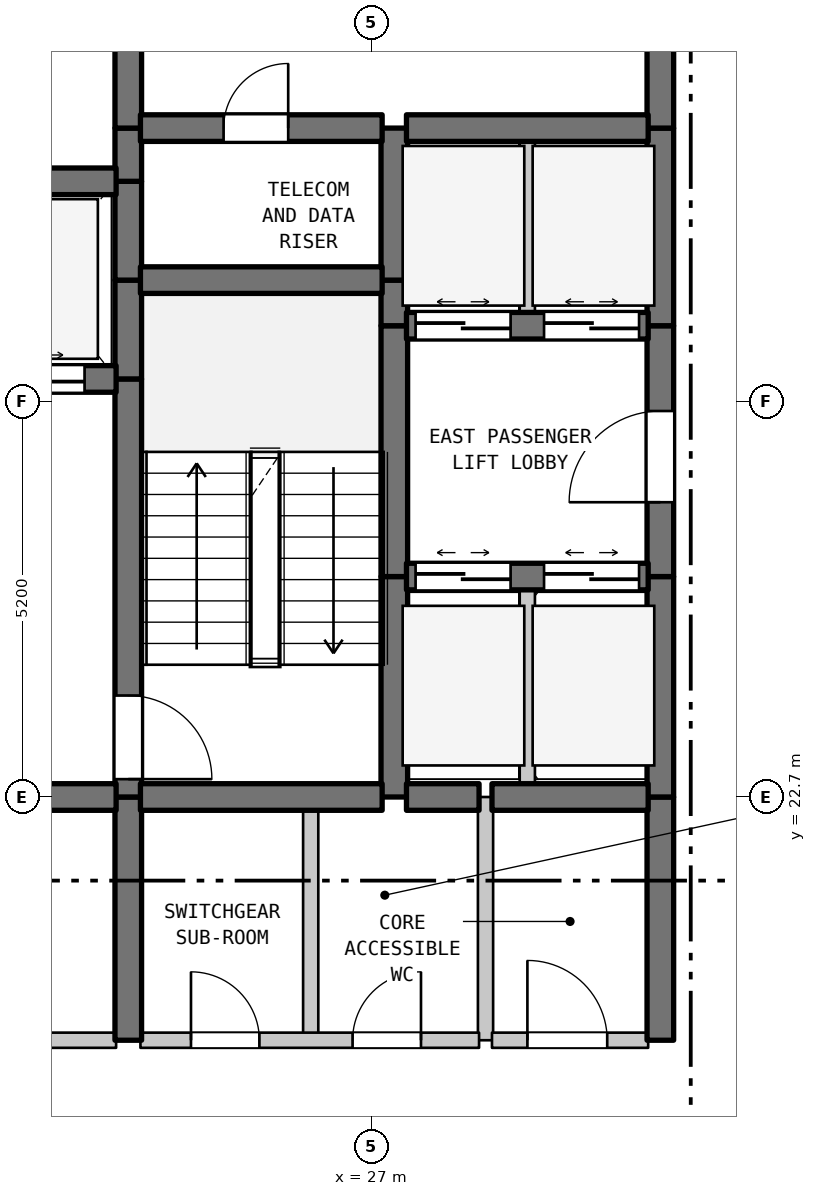
"""IFC4 building model, lengths in metres.
Left out: names, types, materials, properties, quantities, classifications, styles, units other than length and angle.
Written with IfcOpenShell. Run it as: python <this file> out.ifc"""

import sys

from ifc_helpers import new_model, si_unit, direction, frame, frame_2d, origin, place, context, subcontext, project, spatial, rectangle, extrude, element, fill, save


model = new_model("IFC4")
c1 = context("Model", 3, precision=1e-05, world=origin(), true_north=direction((0.0, 1.0)))
c2 = subcontext(c1, "Body", "Model", "MODEL_VIEW")
j1 = project(units=[si_unit("LENGTHUNIT", "METRE"), si_unit("PLANEANGLEUNIT", "RADIAN")], contexts=[c1])
p1 = place(None, origin())
s1 = spatial("IfcSite", under=j1, at=p1, CompositionType="ELEMENT")
p2 = place(p1, origin())
s2 = spatial("IfcBuilding", under=s1, at=p2, CompositionType="ELEMENT")
p3 = place(p2, frame((0.0, 0.0, 94.6)))
s3 = spatial("IfcBuildingStorey", under=s2, at=p3, CompositionType="ELEMENT", Elevation=94.6)
p4 = place(p3, frame((23.8, 19.5, 0.0), z_axis=(0.0, 0.0, 1.0), x_axis=(0.0, 1.0, 0.0)))
e1 = element("IfcWall", 1, at=p4, inside=s3, PredefinedType="SHEAR", context=c2, shape_type="SweptSolid", body=[
    extrude(rectangle(XDim=3.2, YDim=0.35, at=frame_2d((1.6, 0.0))), origin(), (0.0, 0.0, 1.0), 3.385),
])
p5 = place(p3, frame((23.8, 22.7, 0.0), z_axis=(0.0, 0.0, 1.0), x_axis=(0.0, 1.0, 0.0)))
e2 = element("IfcWall", 2, at=p5, inside=s3, PredefinedType="SHEAR", context=c2, shape_type="SweptSolid", body=[
    extrude(rectangle(XDim=5.5, YDim=0.35, at=frame_2d((2.75, 0.0))), origin(), (0.0, 0.0, 1.0), 3.385),
])
p6 = place(p5, frame((0.235, 0.0, 0.0)))
e3 = element("IfcOpeningElement", 3, at=p6, cuts=e2, PredefinedType="OPENING", context=c2, shape_type="SweptSolid", body=[
    extrude(rectangle(XDim=1.1, YDim=2.15, at=frame_2d((0.55, 1.075))), frame((0.0, 0.185, 0.0), z_axis=(0.0, -1.0, 0.0), x_axis=(1.0, 0.0, 0.0)), (0.0, 0.0, 1.0), 0.37),
])
for number, where, z_axis, x_axis in (
    (4, (23.8, 28.2, 0.0), (0.0, 0.0, 1.0), (0.0, 1.0, 0.0)),
    (5, (23.8, 29.5, 0.0), (0.0, 0.0, 1.0), (0.0, 1.0, 0.0)),
):
    element("IfcWall", number, at=place(p3, frame(where, z_axis=z_axis, x_axis=x_axis)), inside=s3, PredefinedType="SHEAR", context=c2, shape_type="SweptSolid", body=[
        extrude(rectangle(XDim=1.3, YDim=0.35, at=frame_2d((0.65, 0.0))), origin(), (0.0, 0.0, 1.0), 3.385),
    ])
p7 = place(p3, frame((23.8, 30.8, 0.0), z_axis=(0.0, 0.0, 1.0), x_axis=(0.0, 1.0, 0.0)))
e6 = element("IfcWall", 6, at=p7, inside=s3, PredefinedType="SHEAR", context=c2, shape_type="SweptSolid", body=[
    extrude(rectangle(XDim=0.7, YDim=0.35, at=frame_2d((0.35, 0.0))), origin(), (0.0, 0.0, 1.0), 3.385),
])
p8 = place(p3, frame((23.8, 31.5, 0.0), z_axis=(0.0, 0.0, 1.0), x_axis=(0.0, 1.0, 0.0)))
e7 = element("IfcWall", 7, at=p8, inside=s3, PredefinedType="SHEAR", context=c2, shape_type="SweptSolid", body=[
    extrude(rectangle(XDim=3.5, YDim=0.35, at=frame_2d((1.75, 0.0))), origin(), (0.0, 0.0, 1.0), 3.385),
])
p9 = place(p8, frame((1.127, 0.0, 0.0)))
e8 = element("IfcOpeningElement", 8, at=p9, cuts=e7, PredefinedType="OPENING", context=c2, shape_type="SweptSolid", body=[
    extrude(rectangle(XDim=1.1, YDim=2.15, at=frame_2d((0.55, 1.075))), frame((0.0, 0.185, 0.0), z_axis=(0.0, -1.0, 0.0), x_axis=(1.0, 0.0, 0.0)), (0.0, 0.0, 1.0), 0.37),
])
p10 = place(p3, frame((26.2, 19.5, 0.0), z_axis=(0.0, 0.0, 1.0), x_axis=(0.0, 1.0, 0.0)))
e9 = element("IfcWall", 9, at=p10, inside=s3, PredefinedType="STANDARD", context=c2, shape_type="SweptSolid", body=[
    extrude(rectangle(XDim=3.2, YDim=0.2, at=frame_2d((1.6, 0.0))), origin(), (0.0, 0.0, 1.0), 3.385),
])
p11 = place(p3, frame((27.3, 22.7, 0.0), z_axis=(0.0, 0.0, 1.0), x_axis=(0.0, 1.0, 0.0)))
e10 = element("IfcWall", 10, at=p11, inside=s3, PredefinedType="SHEAR", context=c2, shape_type="SweptSolid", body=[
    extrude(rectangle(XDim=2.9, YDim=0.35, at=frame_2d((1.45, 0.0))), origin(), (0.0, 0.0, 1.0), 3.385),
])
p12 = place(p3, frame((27.3, 25.6, 0.0), z_axis=(0.0, 0.0, 1.0), x_axis=(0.0, 1.0, 0.0)))
e11 = element("IfcWall", 11, at=p12, inside=s3, PredefinedType="SHEAR", context=c2, shape_type="SweptSolid", body=[
    extrude(rectangle(XDim=3.3, YDim=0.35, at=frame_2d((1.65, 0.0))), origin(), (0.0, 0.0, 1.0), 3.385),
])
p13 = place(p3, frame((27.3, 28.9, 0.0), z_axis=(0.0, 0.0, 1.0), x_axis=(0.0, 1.0, 0.0)))
e12 = element("IfcWall", 12, at=p13, inside=s3, PredefinedType="SHEAR", context=c2, shape_type="SweptSolid", body=[
    extrude(rectangle(XDim=0.6, YDim=0.35, at=frame_2d((0.3, 0.0))), origin(), (0.0, 0.0, 1.0), 3.385),
])
p14 = place(p3, frame((27.3, 29.5, 0.0), z_axis=(0.0, 0.0, 1.0), x_axis=(0.0, 1.0, 0.0)))
e13 = element("IfcWall", 13, at=p14, inside=s3, PredefinedType="SHEAR", context=c2, shape_type="SweptSolid", body=[
    extrude(rectangle(XDim=2.0, YDim=0.35, at=frame_2d((1.0, 0.0))), origin(), (0.0, 0.0, 1.0), 3.385),
])
p15 = place(p3, frame((28.5, 19.5, 0.0), z_axis=(0.0, 0.0, 1.0), x_axis=(0.0, 1.0, 0.0)))
e14 = element("IfcWall", 14, at=p15, inside=s3, PredefinedType="STANDARD", context=c2, shape_type="SweptSolid", body=[
    extrude(rectangle(XDim=3.2, YDim=0.2, at=frame_2d((1.6, 0.0))), origin(), (0.0, 0.0, 1.0), 3.385),
])
p16 = place(p3, frame((29.05, 22.7, 0.0), z_axis=(0.0, 0.0, 1.0), x_axis=(0.0, 1.0, 0.0)))
e15 = element("IfcWall", 15, at=p16, inside=s3, PredefinedType="STANDARD", context=c2, shape_type="SweptSolid", body=[
    extrude(rectangle(XDim=2.9, YDim=0.2, at=frame_2d((1.45, 0.0))), origin(), (0.0, 0.0, 1.0), 3.385),
])
p17 = place(p3, frame((29.05, 28.9, 0.0), z_axis=(0.0, 0.0, 1.0), x_axis=(0.0, 1.0, 0.0)))
e16 = element("IfcWall", 16, at=p17, inside=s3, PredefinedType="STANDARD", context=c2, shape_type="SweptSolid", body=[
    extrude(rectangle(XDim=2.6, YDim=0.2, at=frame_2d((1.3, 0.0))), origin(), (0.0, 0.0, 1.0), 3.385),
])
p18 = place(p3, frame((30.8, 19.5, 0.0), z_axis=(0.0, 0.0, 1.0), x_axis=(0.0, 1.0, 0.0)))
e17 = element("IfcWall", 17, at=p18, inside=s3, PredefinedType="SHEAR", context=c2, shape_type="SweptSolid", body=[
    extrude(rectangle(XDim=3.2, YDim=0.35, at=frame_2d((1.6, 0.0))), origin(), (0.0, 0.0, 1.0), 3.385),
])
p19 = place(p3, frame((30.8, 22.7, 0.0), z_axis=(0.0, 0.0, 1.0), x_axis=(0.0, 1.0, 0.0)))
e18 = element("IfcWall", 18, at=p19, inside=s3, PredefinedType="SHEAR", context=c2, shape_type="SweptSolid", body=[
    extrude(rectangle(XDim=2.9, YDim=0.35, at=frame_2d((1.45, 0.0))), origin(), (0.0, 0.0, 1.0), 3.385),
])
p20 = place(p3, frame((30.8, 25.6, 0.0), z_axis=(0.0, 0.0, 1.0), x_axis=(0.0, 1.0, 0.0)))
e19 = element("IfcWall", 19, at=p20, inside=s3, PredefinedType="SHEAR", context=c2, shape_type="SweptSolid", body=[
    extrude(rectangle(XDim=3.3, YDim=0.35, at=frame_2d((1.65, 0.0))), origin(), (0.0, 0.0, 1.0), 3.385),
])
p21 = place(p20, frame((0.978, 0.0, 0.0)))
e20 = element("IfcOpeningElement", 20, at=p21, cuts=e19, PredefinedType="OPENING", context=c2, shape_type="SweptSolid", body=[
    extrude(rectangle(XDim=1.2, YDim=2.2, at=frame_2d((0.6, 1.1))), frame((0.0, 0.185, 0.0), z_axis=(0.0, -1.0, 0.0), x_axis=(1.0, 0.0, 0.0)), (0.0, 0.0, 1.0), 0.37),
])
p22 = place(p3, frame((30.8, 28.9, 0.0), z_axis=(0.0, 0.0, 1.0), x_axis=(0.0, 1.0, 0.0)))
e21 = element("IfcWall", 21, at=p22, inside=s3, PredefinedType="SHEAR", context=c2, shape_type="SweptSolid", body=[
    extrude(rectangle(XDim=2.6, YDim=0.35, at=frame_2d((1.3, 0.0))), origin(), (0.0, 0.0, 1.0), 3.385),
])
p23 = place(p3, frame((30.8, 31.5, 0.0), z_axis=(0.0, 0.0, 1.0), x_axis=(0.0, 1.0, 0.0)))
e22 = element("IfcWall", 22, at=p23, inside=s3, PredefinedType="SHEAR", context=c2, shape_type="SweptSolid", body=[
    extrude(rectangle(XDim=3.5, YDim=0.35, at=frame_2d((1.75, 0.0))), origin(), (0.0, 0.0, 1.0), 3.385),
])
p24 = place(p23, frame((1.15, 0.0, 0.0)))
e23 = element("IfcOpeningElement", 23, at=p24, cuts=e22, PredefinedType="OPENING", context=c2, shape_type="SweptSolid", body=[
    extrude(rectangle(XDim=1.2, YDim=2.2, at=frame_2d((0.6, 1.1))), frame((0.0, 0.185, 0.0), z_axis=(0.0, -1.0, 0.0), x_axis=(1.0, 0.0, 0.0)), (0.0, 0.0, 1.0), 0.37),
])
p25 = place(p3, frame((19.16, 19.5, 0.0), z_axis=(0.0, 0.0, 1.0), x_axis=(1.0, 0.0, 0.0)))
e24 = element("IfcWall", 24, at=p25, inside=s3, PredefinedType="STANDARD", context=c2, shape_type="SweptSolid", body=[
    extrude(rectangle(XDim=4.48, YDim=0.2, at=frame_2d((2.24, 0.0))), origin(), (0.0, 0.0, 1.0), 3.385),
])
p26 = place(p25, frame((1.64, 0.0, 0.0)))
e25 = element("IfcOpeningElement", 25, at=p26, cuts=e24, PredefinedType="OPENING", context=c2, shape_type="SweptSolid", body=[
    extrude(rectangle(XDim=1.2, YDim=2.2, at=frame_2d((0.6, 1.1))), frame((0.0, 0.11, 0.0), z_axis=(0.0, -1.0, 0.0), x_axis=(1.0, 0.0, 0.0)), (0.0, 0.0, 1.0), 0.22),
])
p27 = place(p3, frame((23.96, 19.5, 0.0), z_axis=(0.0, 0.0, 1.0), x_axis=(1.0, 0.0, 0.0)))
e26 = element("IfcWall", 26, at=p27, inside=s3, PredefinedType="STANDARD", context=c2, shape_type="SweptSolid", body=[
    extrude(rectangle(XDim=4.455, YDim=0.2, at=frame_2d((2.228, 0.0))), origin(), (0.0, 0.0, 1.0), 3.385),
])
p28 = place(p27, frame((0.665, 0.0, 0.0)))
e27 = element("IfcOpeningElement", 27, at=p28, cuts=e26, PredefinedType="OPENING", context=c2, shape_type="SweptSolid", body=[
    extrude(rectangle(XDim=0.9, YDim=2.15, at=frame_2d((0.45, 1.075))), frame((0.0, 0.11, 0.0), z_axis=(0.0, -1.0, 0.0), x_axis=(1.0, 0.0, 0.0)), (0.0, 0.0, 1.0), 0.22),
])
p29 = place(p27, frame((2.791, 0.0, 0.0)))
e28 = element("IfcOpeningElement", 28, at=p29, cuts=e26, PredefinedType="OPENING", context=c2, shape_type="SweptSolid", body=[
    extrude(rectangle(XDim=0.9, YDim=2.15, at=frame_2d((0.45, 1.075))), frame((0.0, 0.11, 0.0), z_axis=(0.0, -1.0, 0.0), x_axis=(1.0, 0.0, 0.0)), (0.0, 0.0, 1.0), 0.22),
])
p30 = place(p3, frame((28.585, 19.5, 0.0), z_axis=(0.0, 0.0, 1.0), x_axis=(1.0, 0.0, 0.0)))
e29 = element("IfcWall", 29, at=p30, inside=s3, PredefinedType="STANDARD", context=c2, shape_type="SweptSolid", body=[
    extrude(rectangle(XDim=2.055, YDim=0.2, at=frame_2d((1.027, 0.0))), origin(), (0.0, 0.0, 1.0), 3.385),
])
p31 = place(p30, frame((0.466, 0.0, 0.0)))
e30 = element("IfcOpeningElement", 30, at=p31, cuts=e29, PredefinedType="OPENING", context=c2, shape_type="SweptSolid", body=[
    extrude(rectangle(XDim=1.05, YDim=2.15, at=frame_2d((0.525, 1.075))), frame((0.0, 0.11, 0.0), z_axis=(0.0, -1.0, 0.0), x_axis=(1.0, 0.0, 0.0)), (0.0, 0.0, 1.0), 0.22),
])
p32 = place(p3, frame((19.16, 22.7, 0.0), z_axis=(0.0, 0.0, 1.0), x_axis=(1.0, 0.0, 0.0)))
e31 = element("IfcWall", 31, at=p32, inside=s3, PredefinedType="SHEAR", context=c2, shape_type="SweptSolid", body=[
    extrude(rectangle(XDim=4.48, YDim=0.35, at=frame_2d((2.24, 0.0))), origin(), (0.0, 0.0, 1.0), 3.385),
])
p33 = place(p32, frame((1.64, 0.0, 0.0)))
e32 = element("IfcOpeningElement", 32, at=p33, cuts=e31, PredefinedType="OPENING", context=c2, shape_type="SweptSolid", body=[
    extrude(rectangle(XDim=1.2, YDim=2.2, at=frame_2d((0.6, 1.1))), frame((0.0, 0.185, 0.0), z_axis=(0.0, -1.0, 0.0), x_axis=(1.0, 0.0, 0.0)), (0.0, 0.0, 1.0), 0.37),
])
p34 = place(p3, frame((23.96, 22.7, 0.0), z_axis=(0.0, 0.0, 1.0), x_axis=(1.0, 0.0, 0.0)))
e33 = element("IfcWall", 33, at=p34, inside=s3, PredefinedType="SHEAR", context=c2, shape_type="SweptSolid", body=[
    extrude(rectangle(XDim=3.18, YDim=0.35, at=frame_2d((1.59, 0.0))), origin(), (0.0, 0.0, 1.0), 3.385),
])
p35 = place(p3, frame((27.46, 22.7, 0.0), z_axis=(0.0, 0.0, 1.0), x_axis=(1.0, 0.0, 0.0)))
e34 = element("IfcWall", 34, at=p35, inside=s3, PredefinedType="SHEAR", context=c2, shape_type="SweptSolid", body=[
    extrude(rectangle(XDim=0.955, YDim=0.35, at=frame_2d((0.478, 0.0))), origin(), (0.0, 0.0, 1.0), 3.385),
])
p36 = place(p3, frame((28.585, 22.7, 0.0), z_axis=(0.0, 0.0, 1.0), x_axis=(1.0, 0.0, 0.0)))
e35 = element("IfcWall", 35, at=p36, inside=s3, PredefinedType="SHEAR", context=c2, shape_type="SweptSolid", body=[
    extrude(rectangle(XDim=2.055, YDim=0.35, at=frame_2d((1.027, 0.0))), origin(), (0.0, 0.0, 1.0), 3.385),
])
p37 = place(p3, frame((27.46, 25.6, 0.0), z_axis=(0.0, 0.0, 1.0), x_axis=(1.0, 0.0, 0.0)))
e36 = element("IfcWall", 36, at=p37, inside=s3, PredefinedType="SHEAR", context=c2, shape_type="SweptSolid", body=[
    extrude(rectangle(XDim=3.18, YDim=0.35, at=frame_2d((1.59, 0.0))), origin(), (0.0, 0.0, 1.0), 3.385),
])
p38 = place(p37, frame((0.12, 0.0, 0.0)))
e37 = element("IfcOpeningElement", 37, at=p38, cuts=e36, PredefinedType="OPENING", context=c2, shape_type="SweptSolid", body=[
    extrude(rectangle(XDim=1.25, YDim=2.2, at=frame_2d((0.625, 1.1))), frame((0.0, 0.185, 0.0), z_axis=(0.0, -1.0, 0.0), x_axis=(1.0, 0.0, 0.0)), (0.0, 0.0, 1.0), 0.37),
])
p39 = place(p37, frame((1.81, 0.0, 0.0)))
e38 = element("IfcOpeningElement", 38, at=p39, cuts=e36, PredefinedType="OPENING", context=c2, shape_type="SweptSolid", body=[
    extrude(rectangle(XDim=1.25, YDim=2.2, at=frame_2d((0.625, 1.1))), frame((0.0, 0.185, 0.0), z_axis=(0.0, -1.0, 0.0), x_axis=(1.0, 0.0, 0.0)), (0.0, 0.0, 1.0), 0.37),
])
p40 = place(p3, frame((19.16, 28.2, 0.0), z_axis=(0.0, 0.0, 1.0), x_axis=(1.0, 0.0, 0.0)))
e39 = element("IfcWall", 39, at=p40, inside=s3, PredefinedType="SHEAR", context=c2, shape_type="SweptSolid", body=[
    extrude(rectangle(XDim=4.48, YDim=0.35, at=frame_2d((2.24, 0.0))), origin(), (0.0, 0.0, 1.0), 3.385),
])
p41 = place(p40, frame((0.415, 0.0, 0.0)))
e40 = element("IfcOpeningElement", 40, at=p41, cuts=e39, PredefinedType="OPENING", context=c2, shape_type="SweptSolid", body=[
    extrude(rectangle(XDim=1.25, YDim=2.2, at=frame_2d((0.625, 1.1))), frame((0.0, 0.185, 0.0), z_axis=(0.0, -1.0, 0.0), x_axis=(1.0, 0.0, 0.0)), (0.0, 0.0, 1.0), 0.37),
])
p42 = place(p40, frame((2.815, 0.0, 0.0)))
e41 = element("IfcOpeningElement", 41, at=p42, cuts=e39, PredefinedType="OPENING", context=c2, shape_type="SweptSolid", body=[
    extrude(rectangle(XDim=1.25, YDim=2.2, at=frame_2d((0.625, 1.1))), frame((0.0, 0.185, 0.0), z_axis=(0.0, -1.0, 0.0), x_axis=(1.0, 0.0, 0.0)), (0.0, 0.0, 1.0), 0.37),
])
p43 = place(p3, frame((27.46, 28.9, 0.0), z_axis=(0.0, 0.0, 1.0), x_axis=(1.0, 0.0, 0.0)))
e42 = element("IfcWall", 42, at=p43, inside=s3, PredefinedType="SHEAR", context=c2, shape_type="SweptSolid", body=[
    extrude(rectangle(XDim=3.18, YDim=0.35, at=frame_2d((1.59, 0.0))), origin(), (0.0, 0.0, 1.0), 3.385),
])
p44 = place(p43, frame((0.12, 0.0, 0.0)))
e43 = element("IfcOpeningElement", 43, at=p44, cuts=e42, PredefinedType="OPENING", context=c2, shape_type="SweptSolid", body=[
    extrude(rectangle(XDim=1.25, YDim=2.2, at=frame_2d((0.625, 1.1))), frame((0.0, 0.185, 0.0), z_axis=(0.0, -1.0, 0.0), x_axis=(1.0, 0.0, 0.0)), (0.0, 0.0, 1.0), 0.37),
])
p45 = place(p43, frame((1.81, 0.0, 0.0)))
e44 = element("IfcOpeningElement", 44, at=p45, cuts=e42, PredefinedType="OPENING", context=c2, shape_type="SweptSolid", body=[
    extrude(rectangle(XDim=1.25, YDim=2.2, at=frame_2d((0.625, 1.1))), frame((0.0, 0.185, 0.0), z_axis=(0.0, -1.0, 0.0), x_axis=(1.0, 0.0, 0.0)), (0.0, 0.0, 1.0), 0.37),
])
p46 = place(p3, frame((23.96, 29.5, 0.0), z_axis=(0.0, 0.0, 1.0), x_axis=(1.0, 0.0, 0.0)))
e45 = element("IfcWall", 45, at=p46, inside=s3, PredefinedType="SHEAR", context=c2, shape_type="SweptSolid", body=[
    extrude(rectangle(XDim=3.18, YDim=0.35, at=frame_2d((1.59, 0.0))), origin(), (0.0, 0.0, 1.0), 3.385),
])
p47 = place(p3, frame((19.16, 30.8, 0.0), z_axis=(0.0, 0.0, 1.0), x_axis=(1.0, 0.0, 0.0)))
e46 = element("IfcWall", 46, at=p47, inside=s3, PredefinedType="SHEAR", context=c2, shape_type="SweptSolid", body=[
    extrude(rectangle(XDim=4.48, YDim=0.35, at=frame_2d((2.24, 0.0))), origin(), (0.0, 0.0, 1.0), 3.385),
])
p48 = place(p3, frame((23.96, 31.5, 0.0), z_axis=(0.0, 0.0, 1.0), x_axis=(1.0, 0.0, 0.0)))
e47 = element("IfcWall", 47, at=p48, inside=s3, PredefinedType="SHEAR", context=c2, shape_type="SweptSolid", body=[
    extrude(rectangle(XDim=3.18, YDim=0.35, at=frame_2d((1.59, 0.0))), origin(), (0.0, 0.0, 1.0), 3.385),
])
p49 = place(p48, frame((1.094, 0.0, 0.0)))
e48 = element("IfcOpeningElement", 48, at=p49, cuts=e47, PredefinedType="OPENING", context=c2, shape_type="SweptSolid", body=[
    extrude(rectangle(XDim=0.85, YDim=2.1, at=frame_2d((0.425, 1.05))), frame((0.0, 0.185, 0.0), z_axis=(0.0, -1.0, 0.0), x_axis=(1.0, 0.0, 0.0)), (0.0, 0.0, 1.0), 0.37),
])
p50 = place(p3, frame((27.46, 31.5, 0.0), z_axis=(0.0, 0.0, 1.0), x_axis=(1.0, 0.0, 0.0)))
e49 = element("IfcWall", 49, at=p50, inside=s3, PredefinedType="SHEAR", context=c2, shape_type="SweptSolid", body=[
    extrude(rectangle(XDim=3.18, YDim=0.35, at=frame_2d((1.59, 0.0))), origin(), (0.0, 0.0, 1.0), 3.385),
])
p51 = place(p6, frame((1.1, 0.0, 0.0), z_axis=(0.0, 0.0, 1.0), x_axis=(-1.0, 0.0, 0.0)))
e50 = element("IfcDoor", 50, at=p51, inside=s3, OperationType="SINGLE_SWING_LEFT", PredefinedType="DOOR", context=c2, shape_type="SweptSolid", body=[
    extrude(rectangle(XDim=1.1, YDim=2.15, at=frame_2d((0.55, 1.075))), frame((0.0, 0.025, 0.0), z_axis=(0.0, -1.0, 0.0), x_axis=(1.0, 0.0, 0.0)), (0.0, 0.0, 1.0), 0.05),
])
fill(e3, e50)
p52 = place(p21, origin())
e51 = element("IfcDoor", 51, at=p52, inside=s3, OperationType="SINGLE_SWING_LEFT", PredefinedType="DOOR", context=c2, shape_type="SweptSolid", body=[
    extrude(rectangle(XDim=1.2, YDim=2.2, at=frame_2d((0.6, 1.1))), frame((0.0, 0.025, 0.0), z_axis=(0.0, -1.0, 0.0), x_axis=(1.0, 0.0, 0.0)), (0.0, 0.0, 1.0), 0.05),
])
fill(e20, e51)
p53 = place(p28, origin())
e52 = element("IfcDoor", 52, at=p53, inside=s3, OperationType="SINGLE_SWING_LEFT", PredefinedType="DOOR", context=c2, shape_type="SweptSolid", body=[
    extrude(rectangle(XDim=0.9, YDim=2.15, at=frame_2d((0.45, 1.075))), frame((0.0, 0.025, 0.0), z_axis=(0.0, -1.0, 0.0), x_axis=(1.0, 0.0, 0.0)), (0.0, 0.0, 1.0), 0.05),
])
fill(e27, e52)
p54 = place(p29, origin())
e53 = element("IfcDoor", 53, at=p54, inside=s3, OperationType="SINGLE_SWING_RIGHT", PredefinedType="DOOR", context=c2, shape_type="SweptSolid", body=[
    extrude(rectangle(XDim=0.9, YDim=2.15, at=frame_2d((0.45, 1.075))), frame((0.0, 0.025, 0.0), z_axis=(0.0, -1.0, 0.0), x_axis=(1.0, 0.0, 0.0)), (0.0, 0.0, 1.0), 0.05),
])
fill(e28, e53)
p55 = place(p31, origin())
e54 = element("IfcDoor", 54, at=p55, inside=s3, OperationType="SINGLE_SWING_LEFT", PredefinedType="DOOR", context=c2, shape_type="SweptSolid", body=[
    extrude(rectangle(XDim=1.05, YDim=2.15, at=frame_2d((0.525, 1.075))), frame((0.0, 0.025, 0.0), z_axis=(0.0, -1.0, 0.0), x_axis=(1.0, 0.0, 0.0)), (0.0, 0.0, 1.0), 0.05),
])
fill(e30, e54)
p56 = place(p38, origin())
e55 = element("IfcDoor", 55, at=p56, inside=s3, OperationType="DOUBLE_DOOR_SLIDING", PredefinedType="DOOR", context=c2, shape_type="SweptSolid", body=[
    extrude(rectangle(XDim=1.25, YDim=2.2, at=frame_2d((0.625, 1.1))), frame((0.0, 0.025, 0.0), z_axis=(0.0, -1.0, 0.0), x_axis=(1.0, 0.0, 0.0)), (0.0, 0.0, 1.0), 0.05),
])
fill(e37, e55)
p57 = place(p39, origin())
e56 = element("IfcDoor", 56, at=p57, inside=s3, OperationType="DOUBLE_DOOR_SLIDING", PredefinedType="DOOR", context=c2, shape_type="SweptSolid", body=[
    extrude(rectangle(XDim=1.25, YDim=2.2, at=frame_2d((0.625, 1.1))), frame((0.0, 0.025, 0.0), z_axis=(0.0, -1.0, 0.0), x_axis=(1.0, 0.0, 0.0)), (0.0, 0.0, 1.0), 0.05),
])
fill(e38, e56)
p58 = place(p42, origin())
e57 = element("IfcDoor", 57, at=p58, inside=s3, OperationType="DOUBLE_DOOR_SLIDING", PredefinedType="DOOR", context=c2, shape_type="SweptSolid", body=[
    extrude(rectangle(XDim=1.25, YDim=2.2, at=frame_2d((0.625, 1.1))), frame((0.0, 0.025, 0.0), z_axis=(0.0, -1.0, 0.0), x_axis=(1.0, 0.0, 0.0)), (0.0, 0.0, 1.0), 0.05),
])
fill(e41, e57)
p59 = place(p44, origin())
e58 = element("IfcDoor", 58, at=p59, inside=s3, OperationType="DOUBLE_DOOR_SLIDING", PredefinedType="DOOR", context=c2, shape_type="SweptSolid", body=[
    extrude(rectangle(XDim=1.25, YDim=2.2, at=frame_2d((0.625, 1.1))), frame((0.0, 0.025, 0.0), z_axis=(0.0, -1.0, 0.0), x_axis=(1.0, 0.0, 0.0)), (0.0, 0.0, 1.0), 0.05),
])
fill(e43, e58)
p60 = place(p45, origin())
e59 = element("IfcDoor", 59, at=p60, inside=s3, OperationType="DOUBLE_DOOR_SLIDING", PredefinedType="DOOR", context=c2, shape_type="SweptSolid", body=[
    extrude(rectangle(XDim=1.25, YDim=2.2, at=frame_2d((0.625, 1.1))), frame((0.0, 0.025, 0.0), z_axis=(0.0, -1.0, 0.0), x_axis=(1.0, 0.0, 0.0)), (0.0, 0.0, 1.0), 0.05),
])
fill(e44, e59)
p61 = place(p49, origin())
e60 = element("IfcDoor", 60, at=p61, inside=s3, OperationType="SINGLE_SWING_RIGHT", PredefinedType="DOOR", context=c2, shape_type="SweptSolid", body=[
    extrude(rectangle(XDim=0.85, YDim=2.1, at=frame_2d((0.425, 1.05))), frame((0.0, 0.025, 0.0), z_axis=(0.0, -1.0, 0.0), x_axis=(1.0, 0.0, 0.0)), (0.0, 0.0, 1.0), 0.05),
])
fill(e48, e60)
save(model, sys.argv[1])
